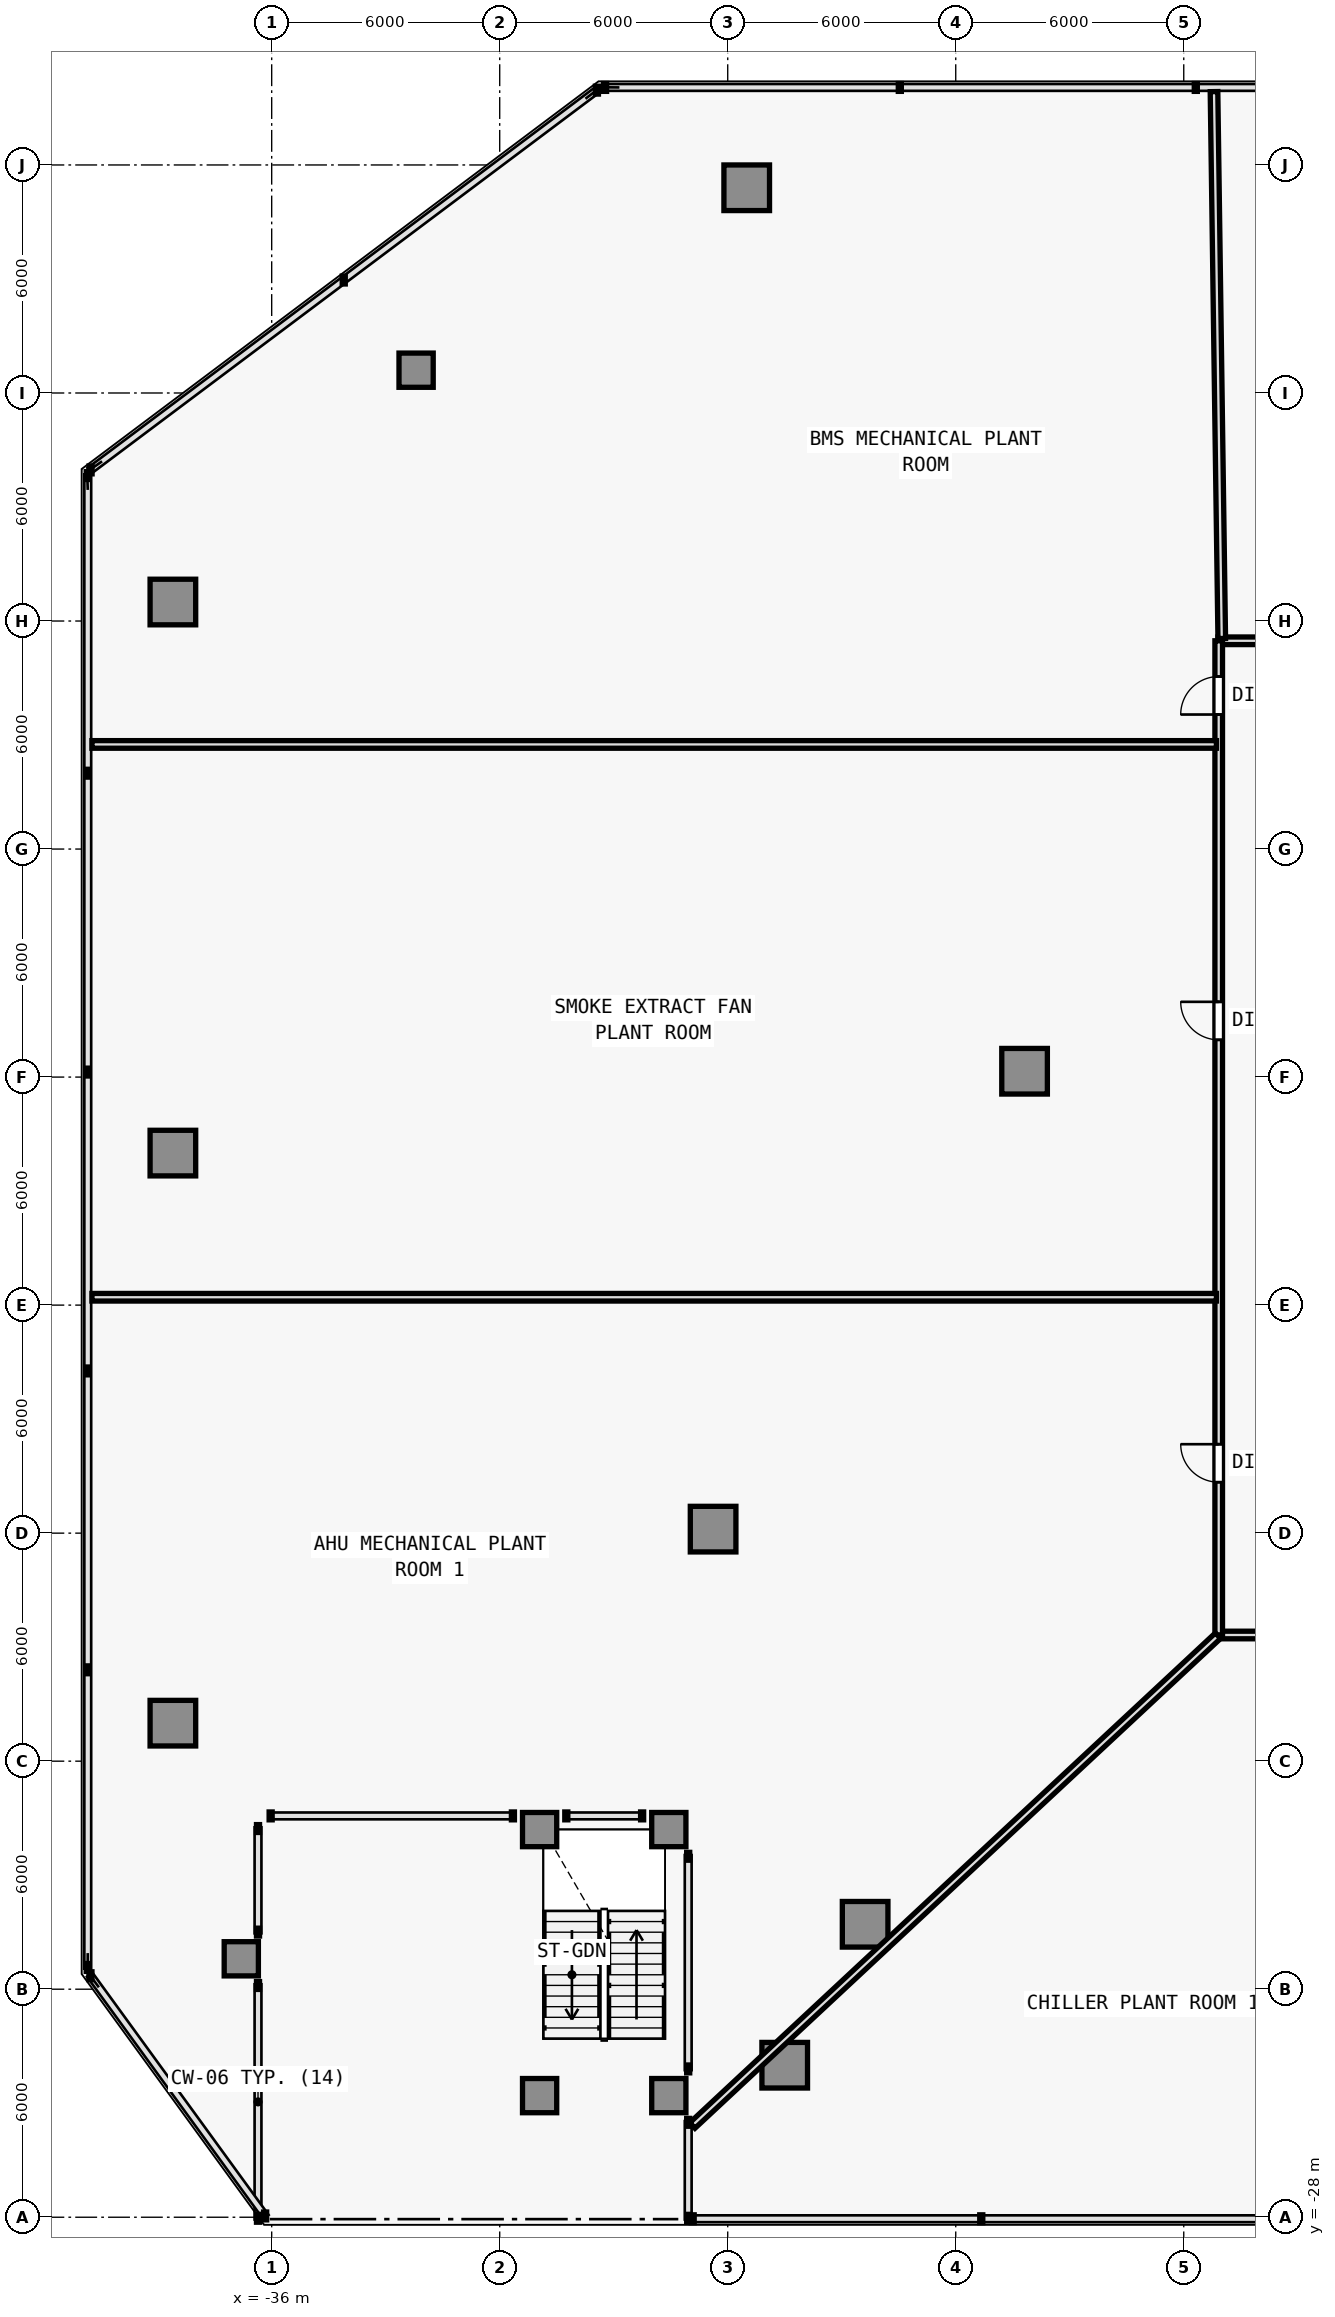
"""IFC4 building model, lengths in metres.
Left out: names, types, materials, properties, quantities, classifications, styles, units other than length and angle.
Written with IfcOpenShell. Run it as: python <this file> out.ifc"""

import sys

from ifc_helpers import new_model, si_unit, direction, frame, frame_2d, origin, origin_2d, place, context, subcontext, project, spatial, rectangle, extrude, element, fill, save


model = new_model("IFC4")
c1 = context("Model", 3, precision=1e-05, world=origin(), true_north=direction((0.0, 1.0)))
c2 = subcontext(c1, "Body", "Model", "MODEL_VIEW")
j1 = project(units=[si_unit("LENGTHUNIT", "METRE"), si_unit("PLANEANGLEUNIT", "RADIAN")], contexts=[c1])
p1 = place(None, origin())
s1 = spatial("IfcSite", under=j1, at=p1, CompositionType="ELEMENT")
p2 = place(p1, origin())
s2 = spatial("IfcBuilding", under=s1, at=p2, CompositionType="ELEMENT")
p3 = place(p2, frame((0.0, 0.0, 21.8)))
s3 = spatial("IfcBuildingStorey", under=s2, at=p3, CompositionType="ELEMENT", Elevation=21.8)
for number, where, z_axis, x_axis in (
    (1, (-23.5, 25.4, 0.0), (0.0, 0.0, 1.0), (1.0, 0.0, 0.0)),
    (2, (-38.6, 14.5, 0.0), (0.0, 0.0, 1.0), (1.0, 0.0, 0.0)),
    (3, (-38.6, 0.0, 0.0), (0.0, 0.0, 1.0), (1.0, 0.0, 0.0)),
    (4, (-38.6, -15.0, 0.0), (0.0, 0.0, 1.0), (1.0, 0.0, 0.0)),
    (5, (-22.5, -24.0, 0.0), (0.0, 0.0, 1.0), (1.0, 0.0, 0.0)),
    (6, (-20.384, -20.292, 0.0), (0.0, 0.0, 1.0), (1.0, 0.0, 0.0)),
    (7, (-16.188, 2.154, 0.0), (0.0, 0.0, 1.0), (1.0, 0.0, 0.0)),
    (8, (-24.385, -9.894, 0.0), (0.0, 0.0, 1.0), (1.0, 0.0, 0.0)),
):
    element("IfcColumn", number, at=place(p3, frame(where, z_axis=z_axis, x_axis=x_axis)), inside=s3, PredefinedType="COLUMN", context=c2, shape_type="SweptSolid", body=[
        extrude(rectangle(XDim=1.2, YDim=1.2, at=origin_2d()), origin(), (0.0, 0.0, 1.0), 4.6),
    ])
for number, where, z_axis, x_axis in (
    (9, (-32.2, 20.6, 0.0), (0.0, 0.0, 1.0), (1.0, 0.0, 0.0)),
    (10, (-36.8, -21.2, 0.0), (0.0, 0.0, 1.0), (1.0, 0.0, 0.0)),
    (11, (-28.95, -24.8, 0.0), (0.0, 0.0, 1.0), (1.0, 0.0, 0.0)),
    (12, (-25.55, -24.8, 0.0), (0.0, 0.0, 1.0), (1.0, 0.0, 0.0)),
    (13, (-28.95, -17.8, 0.0), (0.0, 0.0, 1.0), (1.0, 0.0, 0.0)),
    (14, (-25.55, -17.8, 0.0), (0.0, 0.0, 1.0), (1.0, 0.0, 0.0)),
):
    element("IfcColumn", number, at=place(p3, frame(where, z_axis=z_axis, x_axis=x_axis)), inside=s3, PredefinedType="COLUMN", context=c2, shape_type="SweptSolid", body=[
        extrude(rectangle(XDim=0.9, YDim=0.9, at=origin_2d()), origin(), (0.0, 0.0, 1.0), 4.6),
    ])
p4 = place(p3, frame((-11.1, 13.48, 0.0), z_axis=(0.0, 0.0, 1.0), x_axis=(1.0, 0.0, 0.0)))
e15 = element("IfcWall", 15, at=p4, inside=s3, PredefinedType="SOLIDWALL", context=c2, shape_type="SweptSolid", body=[
    extrude(rectangle(XDim=25.3, YDim=0.2, at=frame_2d((12.65, 0.0))), origin(), (0.0, 0.0, 1.0), 3.025),
])
p5 = place(p4, frame((19.187, 0.0, 0.0)))
e16 = element("IfcOpeningElement", 16, at=p5, cuts=e15, PredefinedType="OPENING", context=c2, shape_type="SweptSolid", body=[
    extrude(rectangle(XDim=1.0, YDim=2.15, at=frame_2d((0.5, 1.075))), frame((0.0, 0.11, 0.0), z_axis=(0.0, -1.0, 0.0), x_axis=(1.0, 0.0, 0.0)), (0.0, 0.0, 1.0), 0.22),
])
p6 = place(p4, frame((6.69, 0.0, 0.0)))
e17 = element("IfcOpeningElement", 17, at=p6, cuts=e15, PredefinedType="OPENING", context=c2, shape_type="SweptSolid", body=[
    extrude(rectangle(XDim=1.0, YDim=2.15, at=frame_2d((0.5, 1.075))), frame((0.0, 0.11, 0.0), z_axis=(0.0, -1.0, 0.0), x_axis=(1.0, 0.0, 0.0)), (0.0, 0.0, 1.0), 0.22),
])
p7 = place(p3, frame((-11.1, -12.68, 0.0), z_axis=(0.0, 0.0, 1.0), x_axis=(1.0, 0.0, 0.0)))
e18 = element("IfcWall", 18, at=p7, inside=s3, PredefinedType="SOLIDWALL", context=c2, shape_type="SweptSolid", body=[
    extrude(rectangle(XDim=25.3, YDim=0.2, at=frame_2d((12.65, 0.0))), origin(), (0.0, 0.0, 1.0), 3.317),
])
p8 = place(p7, frame((3.563, 0.0, 0.0)))
e19 = element("IfcOpeningElement", 19, at=p8, cuts=e18, PredefinedType="OPENING", context=c2, shape_type="SweptSolid", body=[
    extrude(rectangle(XDim=1.0, YDim=2.15, at=frame_2d((0.5, 1.075))), frame((0.0, 0.11, 0.0), z_axis=(0.0, -1.0, 0.0), x_axis=(1.0, 0.0, 0.0)), (0.0, 0.0, 1.0), 0.22),
])
p9 = place(p7, frame((14.729, 0.0, 0.0)))
e20 = element("IfcOpeningElement", 20, at=p9, cuts=e18, PredefinedType="OPENING", context=c2, shape_type="SweptSolid", body=[
    extrude(rectangle(XDim=1.0, YDim=2.15, at=frame_2d((0.5, 1.075))), frame((0.0, 0.11, 0.0), z_axis=(0.0, -1.0, 0.0), x_axis=(1.0, 0.0, 0.0)), (0.0, 0.0, 1.0), 0.22),
])
p10 = place(p7, frame((23.316, 0.0, 0.0)))
e21 = element("IfcOpeningElement", 21, at=p10, cuts=e18, PredefinedType="OPENING", context=c2, shape_type="SweptSolid", body=[
    extrude(rectangle(XDim=1.0, YDim=2.15, at=frame_2d((0.5, 1.075))), frame((0.0, 0.11, 0.0), z_axis=(0.0, -1.0, 0.0), x_axis=(1.0, 0.0, 0.0)), (0.0, 0.0, 1.0), 0.22),
])
p11 = place(p3, frame((-11.08, -12.68, 0.0), z_axis=(0.0, 0.0, 1.0), x_axis=(0.0, 1.0, 0.0)))
e22 = element("IfcWall", 22, at=p11, inside=s3, PredefinedType="SOLIDWALL", context=c2, shape_type="SweptSolid", body=[
    extrude(rectangle(XDim=26.16, YDim=0.2, at=frame_2d((13.08, 0.0))), origin(), (0.0, 0.0, 1.0), 3.025),
])
p12 = place(p11, frame((4.02, 0.0, 0.0)))
e23 = element("IfcOpeningElement", 23, at=p12, cuts=e22, PredefinedType="OPENING", context=c2, shape_type="SweptSolid", body=[
    extrude(rectangle(XDim=1.0, YDim=2.15, at=frame_2d((0.5, 1.075))), frame((0.0, 0.11, 0.0), z_axis=(0.0, -1.0, 0.0), x_axis=(1.0, 0.0, 0.0)), (0.0, 0.0, 1.0), 0.22),
])
p13 = place(p11, frame((24.22, 0.0, 0.0)))
e24 = element("IfcOpeningElement", 24, at=p13, cuts=e22, PredefinedType="OPENING", context=c2, shape_type="SweptSolid", body=[
    extrude(rectangle(XDim=1.0, YDim=2.15, at=frame_2d((0.5, 1.075))), frame((0.0, 0.11, 0.0), z_axis=(0.0, -1.0, 0.0), x_axis=(1.0, 0.0, 0.0)), (0.0, 0.0, 1.0), 0.22),
])
p14 = place(p11, frame((15.66, 0.0, 0.0)))
e25 = element("IfcOpeningElement", 25, at=p14, cuts=e22, PredefinedType="OPENING", context=c2, shape_type="SweptSolid", body=[
    extrude(rectangle(XDim=1.0, YDim=2.15, at=frame_2d((0.5, 1.075))), frame((0.0, 0.11, 0.0), z_axis=(0.0, -1.0, 0.0), x_axis=(1.0, 0.0, 0.0)), (0.0, 0.0, 1.0), 0.22),
])
p15 = place(p3, frame((-11.14, -3.793, 0.0), z_axis=(0.0, 0.0, 1.0), x_axis=(-1.0, 0.0, 0.0)))
e26 = element("IfcWall", 26, at=p15, inside=s3, PredefinedType="SOLIDWALL", context=c2, shape_type="SweptSolid", body=[
    extrude(rectangle(XDim=29.59, YDim=0.2, at=frame_2d((14.795, 0.0))), origin(), (0.0, 0.0, 1.0), 2.925),
])
p16 = place(p3, frame((-11.099, -12.699, 0.0), z_axis=(0.0, 0.0, 1.0), x_axis=(-0.731636066653, -0.681695434906, 0.0)))
e27 = element("IfcWall", 27, at=p16, inside=s3, PredefinedType="SOLIDWALL", context=c2, shape_type="SweptSolid", body=[
    extrude(rectangle(XDim=18.904, YDim=0.2, at=frame_2d((9.452, 0.0))), origin(), (0.0, 0.0, 1.0), 2.925),
])
p17 = place(p3, frame((-11.0, 13.54, 0.0), z_axis=(0.0, 0.0, 1.0), x_axis=(-0.014148326679, 0.999899907417, 0.0)))
e28 = element("IfcWall", 28, at=p17, inside=s3, PredefinedType="SOLIDWALL", context=c2, shape_type="SweptSolid", body=[
    extrude(rectangle(XDim=14.391, YDim=0.2, at=frame_2d((7.196, 0.0))), origin(), (0.0, 0.0, 1.0), 3.317),
])
p18 = place(p3, frame((-11.14, 10.753, 0.0), z_axis=(0.0, 0.0, 1.0), x_axis=(-1.0, 0.0, 0.0)))
e29 = element("IfcWall", 29, at=p18, inside=s3, PredefinedType="SOLIDWALL", context=c2, shape_type="SweptSolid", body=[
    extrude(rectangle(XDim=29.59, YDim=0.2, at=frame_2d((14.795, 0.0))), origin(), (0.0, 0.0, 1.0), 3.735),
])
p19 = place(p12, origin())
e30 = element("IfcDoor", 30, at=p19, inside=s3, OperationType="SINGLE_SWING_RIGHT", PredefinedType="DOOR", context=c2, shape_type="SweptSolid", body=[
    extrude(rectangle(XDim=1.0, YDim=2.15, at=frame_2d((0.5, 1.075))), frame((0.0, 0.025, 0.0), z_axis=(0.0, -1.0, 0.0), x_axis=(1.0, 0.0, 0.0)), (0.0, 0.0, 1.0), 0.05),
])
fill(e23, e30)
p20 = place(p13, origin())
e31 = element("IfcDoor", 31, at=p20, inside=s3, OperationType="SINGLE_SWING_LEFT", PredefinedType="DOOR", context=c2, shape_type="SweptSolid", body=[
    extrude(rectangle(XDim=1.0, YDim=2.15, at=frame_2d((0.5, 1.075))), frame((0.0, 0.025, 0.0), z_axis=(0.0, -1.0, 0.0), x_axis=(1.0, 0.0, 0.0)), (0.0, 0.0, 1.0), 0.05),
])
fill(e24, e31)
p21 = place(p14, origin())
e32 = element("IfcDoor", 32, at=p21, inside=s3, OperationType="SINGLE_SWING_RIGHT", PredefinedType="DOOR", context=c2, shape_type="SweptSolid", body=[
    extrude(rectangle(XDim=1.0, YDim=2.15, at=frame_2d((0.5, 1.075))), frame((0.0, 0.025, 0.0), z_axis=(0.0, -1.0, 0.0), x_axis=(1.0, 0.0, 0.0)), (0.0, 0.0, 1.0), 0.05),
])
fill(e25, e32)
save(model, sys.argv[1])
